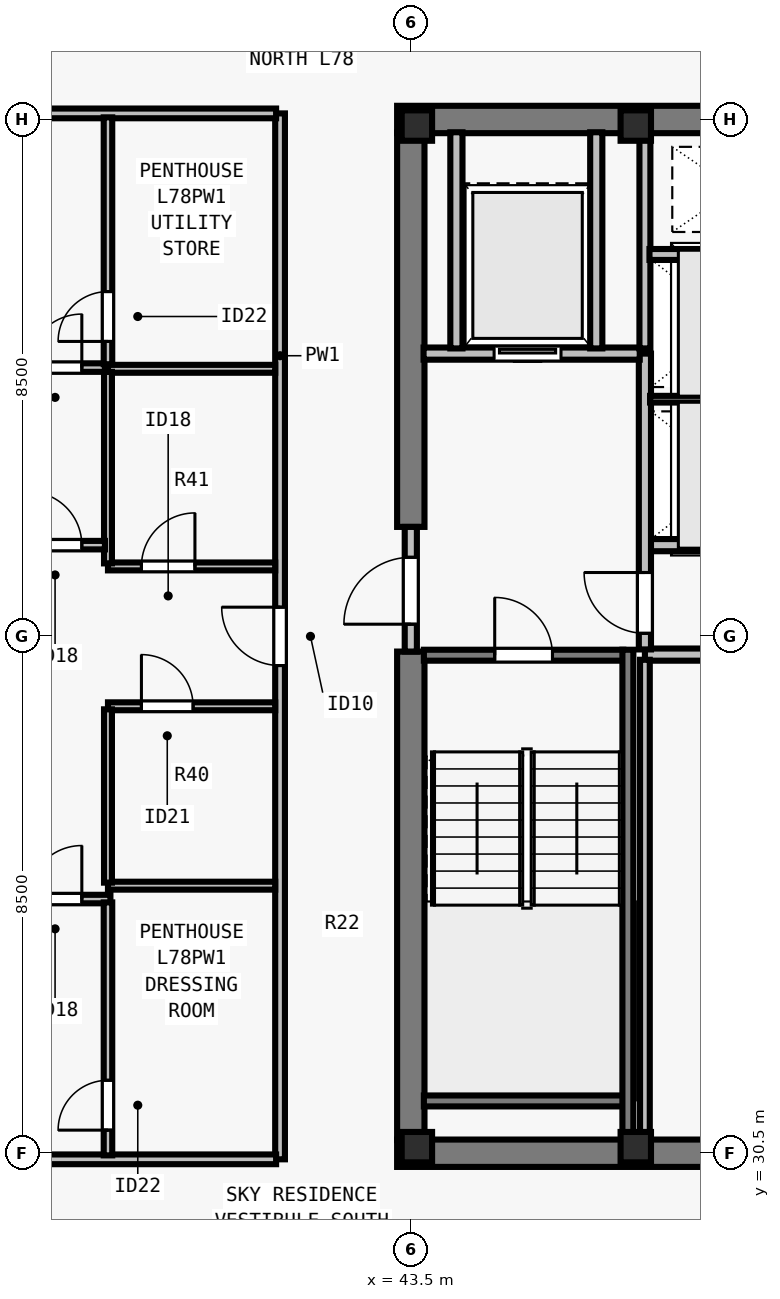
"""IFC4 building model, lengths in metres.
Left out: names, types, materials, properties, quantities, classifications, styles, units other than length and angle.
Written with IfcOpenShell. Run it as: python <this file> out.ifc"""

import sys

from ifc_helpers import new_model, si_unit, direction, frame, frame_2d, origin, origin_2d, place, context, subcontext, project, spatial, rectangle, i_section, extrude, element, fill, save


model = new_model("IFC4")
c1 = context("Model", 3, precision=1e-05, world=origin(), true_north=direction((0.0, 1.0)))
c2 = subcontext(c1, "Body", "Model", "MODEL_VIEW")
j1 = project(units=[si_unit("LENGTHUNIT", "METRE"), si_unit("PLANEANGLEUNIT", "RADIAN")], contexts=[c1])
p1 = place(None, origin())
s1 = spatial("IfcSite", under=j1, at=p1, CompositionType="ELEMENT")
p2 = place(p1, origin())
s2 = spatial("IfcBuilding", under=s1, at=p2, CompositionType="ELEMENT")
p3 = place(p2, frame((0.0, 0.0, 284.0)))
s3 = spatial("IfcBuildingStorey", under=s2, at=p3, CompositionType="ELEMENT", Elevation=284.0)
for number, where, z_axis, x_axis in (
    (1, (43.6, 30.6, 0.0), (0.0, 0.0, 1.0), (1.0, 0.0, 0.0)),
    (2, (47.2, 30.6, 0.0), (0.0, 0.0, 1.0), (1.0, 0.0, 0.0)),
    (3, (43.6, 47.4, 0.0), (0.0, 0.0, 1.0), (1.0, 0.0, 0.0)),
    (4, (47.2, 47.4, 0.0), (0.0, 0.0, 1.0), (1.0, 0.0, 0.0)),
):
    element("IfcColumn", number, at=place(p3, frame(where, z_axis=z_axis, x_axis=x_axis)), inside=s3, PredefinedType="COLUMN", context=c2, shape_type="SweptSolid", body=[
        extrude(i_section(OverallWidth=0.5, OverallDepth=0.5, WebThickness=0.028, FlangeThickness=0.045, at=origin_2d()), origin(), (0.0, 0.0, 1.0), 3.5),
    ])
for number, where, z_axis, x_axis in (
    (5, (43.275, 30.5, 0.0), (0.0, 0.0, 1.0), (1.0, 0.0, 0.0)),
    (6, (43.275, 47.5, 0.0), (0.0, 0.0, 1.0), (1.0, 0.0, 0.0)),
):
    element("IfcWall", number, at=place(p3, frame(where, z_axis=z_axis, x_axis=x_axis)), inside=s3, PredefinedType="SHEAR", context=c2, shape_type="SweptSolid", body=[
        extrude(rectangle(XDim=17.45, YDim=0.45, at=frame_2d((8.725, 0.0))), origin(), (0.0, 0.0, 1.0), 3.29),
    ])
p4 = place(p3, frame((43.5, 30.715, 0.0), z_axis=(0.0, 0.0, 1.0), x_axis=(0.0, 1.0, 0.0)))
e7 = element("IfcWall", 7, at=p4, inside=s3, PredefinedType="SHEAR", context=c2, shape_type="SweptSolid", body=[
    extrude(rectangle(XDim=8.035, YDim=0.45, at=frame_2d((4.018, 0.0))), origin(), (0.0, 0.0, 1.0), 3.29),
])
p5 = place(p3, frame((43.5, 40.8, 0.0), z_axis=(0.0, 0.0, 1.0), x_axis=(0.0, 1.0, 0.0)))
e8 = element("IfcWall", 8, at=p5, inside=s3, PredefinedType="SHEAR", context=c2, shape_type="SweptSolid", body=[
    extrude(rectangle(XDim=6.485, YDim=0.45, at=frame_2d((3.242, 0.0))), origin(), (0.0, 0.0, 1.0), 3.29),
])
for number, where, z_axis, x_axis in (
    (9, (47.35, 38.7, 0.0), (0.0, 0.0, 1.0), (1.0, 0.0, 0.0)),
    (10, (47.35, 40.5, 0.0), (0.0, 0.0, 1.0), (1.0, 0.0, 0.0)),
):
    element("IfcWall", number, at=place(p3, frame(where, z_axis=z_axis, x_axis=x_axis)), inside=s3, PredefinedType="SOLIDWALL", context=c2, shape_type="SweptSolid", body=[
        extrude(rectangle(XDim=2.95, YDim=0.2, at=frame_2d((1.475, 0.0))), origin(), (0.0, 0.0, 1.0), 3.29),
    ])
p6 = place(p3, frame((43.5, 38.75, 0.0), z_axis=(0.0, 0.0, 1.0), x_axis=(0.0, 1.0, 0.0)))
e11 = element("IfcWall", 11, at=p6, inside=s3, PredefinedType="SOLIDWALL", context=c2, shape_type="SweptSolid", body=[
    extrude(rectangle(XDim=2.05, YDim=0.2, at=frame_2d((1.025, 0.0))), origin(), (0.0, 0.0, 1.0), 3.29),
])
p7 = place(p6, frame((0.45, 0.0, 0.0)))
e12 = element("IfcOpeningElement", 12, at=p7, cuts=e11, PredefinedType="OPENING", context=c2, shape_type="SweptSolid", body=[
    extrude(rectangle(XDim=1.1, YDim=2.15, at=frame_2d((0.55, 1.075))), frame((0.0, 0.11, 0.0), z_axis=(0.0, -1.0, 0.0), x_axis=(1.0, 0.0, 0.0)), (0.0, 0.0, 1.0), 0.22),
])
p8 = place(p3, frame((47.35, 38.785, 0.0), z_axis=(0.0, 0.0, 1.0), x_axis=(0.0, 1.0, 0.0)))
e13 = element("IfcWall", 13, at=p8, inside=s3, PredefinedType="SOLIDWALL", context=c2, shape_type="SweptSolid", body=[
    extrude(rectangle(XDim=4.865, YDim=0.2, at=frame_2d((2.433, 0.0))), origin(), (0.0, 0.0, 1.0), 3.29),
])
p9 = place(p8, frame((0.265, 0.0, 0.0)))
e14 = element("IfcOpeningElement", 14, at=p9, cuts=e13, PredefinedType="OPENING", context=c2, shape_type="SweptSolid", body=[
    extrude(rectangle(XDim=1.0, YDim=2.15, at=frame_2d((0.5, 1.075))), frame((0.0, 0.11, 0.0), z_axis=(0.0, -1.0, 0.0), x_axis=(1.0, 0.0, 0.0)), (0.0, 0.0, 1.0), 0.22),
])
p10 = place(p3, frame((43.71, 43.65, 0.0), z_axis=(0.0, 0.0, 1.0), x_axis=(1.0, 0.0, 0.0)))
e15 = element("IfcWall", 15, at=p10, inside=s3, PredefinedType="SOLIDWALL", context=c2, shape_type="SweptSolid", body=[
    extrude(rectangle(XDim=3.555, YDim=0.2, at=frame_2d((1.777, 0.0))), origin(), (0.0, 0.0, 1.0), 3.29),
])
p11 = place(p10, frame((1.16, 0.0, 0.0)))
e16 = element("IfcOpeningElement", 16, at=p11, cuts=e15, PredefinedType="OPENING", context=c2, shape_type="SweptSolid", body=[
    extrude(rectangle(XDim=1.1, YDim=2.2, at=frame_2d((0.55, 1.1))), frame((0.0, 0.11, 0.0), z_axis=(0.0, -1.0, 0.0), x_axis=(1.0, 0.0, 0.0)), (0.0, 0.0, 1.0), 0.22),
])
for number, where, z_axis, x_axis in (
    (17, (46.55, 43.735, 0.0), (0.0, 0.0, 1.0), (0.0, 1.0, 0.0)),
    (18, (44.25, 43.735, 0.0), (0.0, 0.0, 1.0), (0.0, 1.0, 0.0)),
):
    element("IfcWall", number, at=place(p3, frame(where, z_axis=z_axis, x_axis=x_axis)), inside=s3, PredefinedType="SOLIDWALL", context=c2, shape_type="SweptSolid", body=[
        extrude(rectangle(XDim=3.555, YDim=0.2, at=frame_2d((1.777, 0.0))), origin(), (0.0, 0.0, 1.0), 3.29),
    ])
p12 = place(p3, frame((47.35, 30.71, 0.0), z_axis=(0.0, 0.0, 1.0), x_axis=(0.0, 1.0, 0.0)))
e19 = element("IfcWall", 19, at=p12, inside=s3, PredefinedType="PARTITIONING", context=c2, shape_type="SweptSolid", body=[
    extrude(rectangle(XDim=7.905, YDim=0.16, at=frame_2d((3.953, 0.0))), origin(), (0.0, 0.0, 1.0), 3.29),
])
p13 = place(p3, frame((47.35, 43.735, 0.0), z_axis=(0.0, 0.0, 1.0), x_axis=(0.0, 1.0, 0.0)))
e20 = element("IfcWall", 20, at=p13, inside=s3, PredefinedType="SOLIDWALL", context=c2, shape_type="SweptSolid", body=[
    extrude(rectangle(XDim=3.555, YDim=0.18, at=frame_2d((1.777, 0.0))), origin(), (0.0, 0.0, 1.0), 3.29),
])
p14 = place(p3, frame((47.435, 42.9, 0.0), z_axis=(0.0, 0.0, 1.0), x_axis=(1.0, 0.0, 0.0)))
e21 = element("IfcWall", 21, at=p14, inside=s3, PredefinedType="PARTITIONING", context=c2, shape_type="SweptSolid", body=[
    extrude(rectangle(XDim=2.78, YDim=0.11, at=frame_2d((1.39, 0.0))), origin(), (0.0, 0.0, 1.0), 3.29),
])
p15 = place(p3, frame((47.425, 45.28, 0.0), z_axis=(0.0, 0.0, 1.0), x_axis=(1.0, 0.0, 0.0)))
e22 = element("IfcWall", 22, at=p15, inside=s3, PredefinedType="SOLIDWALL", context=c2, shape_type="SweptSolid", body=[
    extrude(rectangle(XDim=2.79, YDim=0.18, at=frame_2d((1.395, 0.0))), origin(), (0.0, 0.0, 1.0), 3.29),
])
p16 = place(p3, frame((41.35, 30.4, 0.0), z_axis=(0.0, 0.0, 1.0), x_axis=(0.0, 1.0, 0.0)))
e23 = element("IfcWall", 23, at=p16, inside=s3, PredefinedType="PARTITIONING", context=c2, shape_type="SweptSolid", body=[
    extrude(rectangle(XDim=17.2, YDim=0.16, at=frame_2d((8.6, 0.0))), origin(), (0.0, 0.0, 1.0), 3.009),
])
p17 = place(p16, frame((8.12, 0.0, 0.0)))
e24 = element("IfcOpeningElement", 24, at=p17, cuts=e23, PredefinedType="OPENING", context=c2, shape_type="SweptSolid", body=[
    extrude(rectangle(XDim=0.96, YDim=2.18, at=frame_2d((0.48, 1.09))), frame((0.0, 0.09, 0.0), z_axis=(0.0, -1.0, 0.0), x_axis=(1.0, 0.0, 0.0)), (0.0, 0.0, 1.0), 0.18),
])
for number, where, z_axis, x_axis in (
    (25, (31.285, 30.4, 0.0), (0.0, 0.0, 1.0), (1.0, 0.0, 0.0)),
    (26, (31.285, 47.6, 0.0), (0.0, 0.0, 1.0), (1.0, 0.0, 0.0)),
):
    element("IfcWall", number, at=place(p3, frame(where, z_axis=z_axis, x_axis=x_axis)), inside=s3, PredefinedType="PARTITIONING", context=c2, shape_type="SweptSolid", body=[
        extrude(rectangle(XDim=10.0, YDim=0.16, at=frame_2d((5.0, 0.0))), origin(), (0.0, 0.0, 1.0), 3.29),
    ])
p18 = place(p3, frame((38.52, 34.9, 0.0), z_axis=(0.0, 0.0, 1.0), x_axis=(1.0, 0.0, 0.0)))
e27 = element("IfcWall", 27, at=p18, inside=s3, PredefinedType="PLUMBINGWALL", context=c2, shape_type="SweptSolid", body=[
    extrude(rectangle(XDim=2.75, YDim=0.13, at=frame_2d((1.375, 0.0))), origin(), (0.0, 0.0, 1.0), 3.29),
])
p19 = place(p3, frame((38.52, 37.85, 0.0), z_axis=(0.0, 0.0, 1.0), x_axis=(1.0, 0.0, 0.0)))
e28 = element("IfcWall", 28, at=p19, inside=s3, PredefinedType="PLUMBINGWALL", context=c2, shape_type="SweptSolid", body=[
    extrude(rectangle(XDim=2.75, YDim=0.13, at=frame_2d((1.375, 0.0))), origin(), (0.0, 0.0, 1.0), 3.29),
])
p20 = place(p19, frame((0.55, 0.0, 0.0)))
e29 = element("IfcOpeningElement", 29, at=p20, cuts=e28, PredefinedType="OPENING", context=c2, shape_type="SweptSolid", body=[
    extrude(rectangle(XDim=0.85, YDim=2.08, at=frame_2d((0.425, 1.04))), frame((0.0, 0.075, 0.0), z_axis=(0.0, -1.0, 0.0), x_axis=(1.0, 0.0, 0.0)), (0.0, 0.0, 1.0), 0.15),
])
p21 = place(p3, frame((38.52, 34.95, 0.0), z_axis=(0.0, 0.0, 1.0), x_axis=(0.0, 1.0, 0.0)))
e30 = element("IfcWall", 30, at=p21, inside=s3, PredefinedType="PLUMBINGWALL", context=c2, shape_type="SweptSolid", body=[
    extrude(rectangle(XDim=2.85, YDim=0.13, at=frame_2d((1.425, 0.0))), origin(), (0.0, 0.0, 1.0), 3.29),
])
p22 = place(p3, frame((38.52, 43.4, 0.0), z_axis=(0.0, 0.0, 1.0), x_axis=(1.0, 0.0, 0.0)))
e31 = element("IfcWall", 31, at=p22, inside=s3, PredefinedType="PLUMBINGWALL", context=c2, shape_type="SweptSolid", body=[
    extrude(rectangle(XDim=2.75, YDim=0.13, at=frame_2d((1.375, 0.0))), origin(), (0.0, 0.0, 1.0), 3.29),
])
p23 = place(p3, frame((38.52, 40.15, 0.0), z_axis=(0.0, 0.0, 1.0), x_axis=(1.0, 0.0, 0.0)))
e32 = element("IfcWall", 32, at=p23, inside=s3, PredefinedType="PLUMBINGWALL", context=c2, shape_type="SweptSolid", body=[
    extrude(rectangle(XDim=2.75, YDim=0.13, at=frame_2d((1.375, 0.0))), origin(), (0.0, 0.0, 1.0), 3.29),
])
p24 = place(p23, frame((0.55, 0.0, 0.0)))
e33 = element("IfcOpeningElement", 33, at=p24, cuts=e32, PredefinedType="OPENING", context=c2, shape_type="SweptSolid", body=[
    extrude(rectangle(XDim=0.88, YDim=2.1, at=frame_2d((0.44, 1.05))), frame((0.0, 0.075, 0.0), z_axis=(0.0, -1.0, 0.0), x_axis=(1.0, 0.0, 0.0)), (0.0, 0.0, 1.0), 0.15),
])
p25 = place(p3, frame((38.52, 40.2, 0.0), z_axis=(0.0, 0.0, 1.0), x_axis=(0.0, 1.0, 0.0)))
e34 = element("IfcWall", 34, at=p25, inside=s3, PredefinedType="PLUMBINGWALL", context=c2, shape_type="SweptSolid", body=[
    extrude(rectangle(XDim=3.15, YDim=0.13, at=frame_2d((1.575, 0.0))), origin(), (0.0, 0.0, 1.0), 3.009),
])
p26 = place(p3, frame((31.38, 34.68, 0.0), z_axis=(0.0, 0.0, 1.0), x_axis=(1.0, 0.0, 0.0)))
e35 = element("IfcWall", 35, at=p26, inside=s3, PredefinedType="PARTITIONING", context=c2, shape_type="SweptSolid", body=[
    extrude(rectangle(XDim=7.18, YDim=0.14, at=frame_2d((3.59, 0.0))), origin(), (0.0, 0.0, 1.0), 3.29),
])
p27 = place(p26, frame((5.83, 0.0, 0.0)))
e36 = element("IfcOpeningElement", 36, at=p27, cuts=e35, PredefinedType="OPENING", context=c2, shape_type="SweptSolid", body=[
    extrude(rectangle(XDim=0.88, YDim=2.1, at=frame_2d((0.44, 1.05))), frame((0.0, 0.08, 0.0), z_axis=(0.0, -1.0, 0.0), x_axis=(1.0, 0.0, 0.0)), (0.0, 0.0, 1.0), 0.16),
])
p28 = place(p3, frame((38.52, 30.465, 0.0), z_axis=(0.0, 0.0, 1.0), x_axis=(0.0, 1.0, 0.0)))
e37 = element("IfcWall", 37, at=p28, inside=s3, PredefinedType="PARTITIONING", context=c2, shape_type="SweptSolid", body=[
    extrude(rectangle(XDim=4.16, YDim=0.14, at=frame_2d((2.08, 0.0))), origin(), (0.0, 0.0, 1.0), 3.29),
])
p29 = place(p28, frame((0.415, 0.0, 0.0)))
e38 = element("IfcOpeningElement", 38, at=p29, cuts=e37, PredefinedType="OPENING", context=c2, shape_type="SweptSolid", body=[
    extrude(rectangle(XDim=0.82, YDim=2.1, at=frame_2d((0.41, 1.05))), frame((0.0, 0.08, 0.0), z_axis=(0.0, -1.0, 0.0), x_axis=(1.0, 0.0, 0.0)), (0.0, 0.0, 1.0), 0.16),
])
p30 = place(p3, frame((31.38, 43.42, 0.0), z_axis=(0.0, 0.0, 1.0), x_axis=(1.0, 0.0, 0.0)))
e39 = element("IfcWall", 39, at=p30, inside=s3, PredefinedType="PARTITIONING", context=c2, shape_type="SweptSolid", body=[
    extrude(rectangle(XDim=7.09, YDim=0.14, at=frame_2d((3.545, 0.0))), origin(), (0.0, 0.0, 1.0), 3.29),
])
p31 = place(p30, frame((5.83, 0.0, 0.0)))
e40 = element("IfcOpeningElement", 40, at=p31, cuts=e39, PredefinedType="OPENING", context=c2, shape_type="SweptSolid", body=[
    extrude(rectangle(XDim=0.88, YDim=2.1, at=frame_2d((0.44, 1.05))), frame((0.0, 0.08, 0.0), z_axis=(0.0, -1.0, 0.0), x_axis=(1.0, 0.0, 0.0)), (0.0, 0.0, 1.0), 0.16),
])
p32 = place(p3, frame((38.52, 43.475, 0.0), z_axis=(0.0, 0.0, 1.0), x_axis=(0.0, 1.0, 0.0)))
e41 = element("IfcWall", 41, at=p32, inside=s3, PredefinedType="PARTITIONING", context=c2, shape_type="SweptSolid", body=[
    extrude(rectangle(XDim=4.06, YDim=0.14, at=frame_2d((2.03, 0.0))), origin(), (0.0, 0.0, 1.0), 3.29),
])
p33 = place(p32, frame((0.375, 0.0, 0.0)))
e42 = element("IfcOpeningElement", 42, at=p33, cuts=e41, PredefinedType="OPENING", context=c2, shape_type="SweptSolid", body=[
    extrude(rectangle(XDim=0.82, YDim=2.1, at=frame_2d((0.41, 1.05))), frame((0.0, 0.08, 0.0), z_axis=(0.0, -1.0, 0.0), x_axis=(1.0, 0.0, 0.0)), (0.0, 0.0, 1.0), 0.16),
])
p34 = place(p3, frame((31.38, 40.5, 0.0), z_axis=(0.0, 0.0, 1.0), x_axis=(1.0, 0.0, 0.0)))
e43 = element("IfcWall", 43, at=p34, inside=s3, PredefinedType="PARTITIONING", context=c2, shape_type="SweptSolid", body=[
    extrude(rectangle(XDim=7.09, YDim=0.14, at=frame_2d((3.545, 0.0))), origin(), (0.0, 0.0, 1.0), 3.29),
])
p35 = place(p34, frame((5.83, 0.0, 0.0)))
e44 = element("IfcOpeningElement", 44, at=p35, cuts=e43, PredefinedType="OPENING", context=c2, shape_type="SweptSolid", body=[
    extrude(rectangle(XDim=0.88, YDim=2.1, at=frame_2d((0.44, 1.05))), frame((0.0, 0.08, 0.0), z_axis=(0.0, -1.0, 0.0), x_axis=(1.0, 0.0, 0.0)), (0.0, 0.0, 1.0), 0.16),
])
p36 = place(p3, frame((43.715, 38.69, 0.0), z_axis=(0.0, 0.0, 1.0), x_axis=(1.0, 0.0, 0.0)))
e45 = element("IfcWall", 45, at=p36, inside=s3, PredefinedType="SOLIDWALL", context=c2, shape_type="SweptSolid", body=[
    extrude(rectangle(XDim=3.28, YDim=0.18, at=frame_2d((1.64, 0.0))), origin(), (0.0, 0.0, 1.0), 3.29),
])
p37 = place(p36, frame((1.165, 0.0, 0.0)))
e46 = element("IfcOpeningElement", 46, at=p37, cuts=e45, PredefinedType="OPENING", context=c2, shape_type="SweptSolid", body=[
    extrude(rectangle(XDim=0.95, YDim=2.15, at=frame_2d((0.475, 1.075))), frame((0.0, 0.1, 0.0), z_axis=(0.0, -1.0, 0.0), x_axis=(1.0, 0.0, 0.0)), (0.0, 0.0, 1.0), 0.2),
])
p38 = place(p3, frame((43.715, 31.36, 0.0), z_axis=(0.0, 0.0, 1.0), x_axis=(1.0, 0.0, 0.0)))
e47 = element("IfcWall", 47, at=p38, inside=s3, PredefinedType="SOLIDWALL", context=c2, shape_type="SweptSolid", body=[
    extrude(rectangle(XDim=3.28, YDim=0.18, at=frame_2d((1.64, 0.0))), origin(), (0.0, 0.0, 1.0), 3.29),
])
p39 = place(p3, frame((47.07, 38.78, 0.0), z_axis=(0.0, 0.0, 1.0), x_axis=(0.0, -1.0, 0.0)))
e48 = element("IfcWall", 48, at=p39, inside=s3, PredefinedType="SOLIDWALL", context=c2, shape_type="SweptSolid", body=[
    extrude(rectangle(XDim=8.067, YDim=0.18, at=frame_2d((4.034, 0.0))), origin(), (0.0, 0.0, 1.0), 3.29),
])
p40 = place(p7, origin())
e49 = element("IfcDoor", 49, at=p40, inside=s3, OperationType="SINGLE_SWING_LEFT", PredefinedType="DOOR", context=c2, shape_type="SweptSolid", body=[
    extrude(rectangle(XDim=1.1, YDim=2.15, at=frame_2d((0.55, 1.075))), frame((0.0, 0.025, 0.0), z_axis=(0.0, -1.0, 0.0), x_axis=(1.0, 0.0, 0.0)), (0.0, 0.0, 1.0), 0.05),
])
fill(e12, e49)
p41 = place(p9, origin())
e50 = element("IfcDoor", 50, at=p41, inside=s3, OperationType="SINGLE_SWING_RIGHT", PredefinedType="DOOR", context=c2, shape_type="SweptSolid", body=[
    extrude(rectangle(XDim=1.0, YDim=2.15, at=frame_2d((0.5, 1.075))), frame((0.0, 0.025, 0.0), z_axis=(0.0, -1.0, 0.0), x_axis=(1.0, 0.0, 0.0)), (0.0, 0.0, 1.0), 0.05),
])
fill(e14, e50)
p42 = place(p11, origin())
e51 = element("IfcDoor", 51, at=p42, inside=s3, OperationType="SLIDING_TO_LEFT", PredefinedType="DOOR", context=c2, shape_type="SweptSolid", body=[
    extrude(rectangle(XDim=1.1, YDim=2.2, at=frame_2d((0.55, 1.1))), frame((0.0, 0.025, 0.0), z_axis=(0.0, -1.0, 0.0), x_axis=(1.0, 0.0, 0.0)), (0.0, 0.0, 1.0), 0.05),
])
fill(e16, e51)
p43 = place(p20, origin())
e52 = element("IfcDoor", 52, at=p43, inside=s3, OperationType="SINGLE_SWING_LEFT", PredefinedType="DOOR", context=c2, shape_type="SweptSolid", body=[
    extrude(rectangle(XDim=0.85, YDim=2.08, at=frame_2d((0.425, 1.04))), frame((0.0, 0.025, 0.0), z_axis=(0.0, -1.0, 0.0), x_axis=(1.0, 0.0, 0.0)), (0.0, 0.0, 1.0), 0.05),
])
fill(e29, e52)
p44 = place(p24, origin())
e53 = element("IfcDoor", 53, at=p44, inside=s3, OperationType="SINGLE_SWING_RIGHT", PredefinedType="DOOR", context=c2, shape_type="SweptSolid", body=[
    extrude(rectangle(XDim=0.88, YDim=2.1, at=frame_2d((0.44, 1.05))), frame((0.0, 0.025, 0.0), z_axis=(0.0, -1.0, 0.0), x_axis=(1.0, 0.0, 0.0)), (0.0, 0.0, 1.0), 0.05),
])
fill(e33, e53)
p45 = place(p29, origin())
e54 = element("IfcDoor", 54, at=p45, inside=s3, OperationType="SINGLE_SWING_LEFT", PredefinedType="DOOR", context=c2, shape_type="SweptSolid", body=[
    extrude(rectangle(XDim=0.82, YDim=2.1, at=frame_2d((0.41, 1.05))), frame((0.0, 0.025, 0.0), z_axis=(0.0, -1.0, 0.0), x_axis=(1.0, 0.0, 0.0)), (0.0, 0.0, 1.0), 0.05),
])
fill(e38, e54)
p46 = place(p27, origin())
e55 = element("IfcDoor", 55, at=p46, inside=s3, OperationType="SINGLE_SWING_RIGHT", PredefinedType="DOOR", context=c2, shape_type="SweptSolid", body=[
    extrude(rectangle(XDim=0.88, YDim=2.1, at=frame_2d((0.44, 1.05))), frame((0.0, 0.025, 0.0), z_axis=(0.0, -1.0, 0.0), x_axis=(1.0, 0.0, 0.0)), (0.0, 0.0, 1.0), 0.05),
])
fill(e36, e55)
p47 = place(p33, origin())
e56 = element("IfcDoor", 56, at=p47, inside=s3, OperationType="SINGLE_SWING_LEFT", PredefinedType="DOOR", context=c2, shape_type="SweptSolid", body=[
    extrude(rectangle(XDim=0.82, YDim=2.1, at=frame_2d((0.41, 1.05))), frame((0.0, 0.025, 0.0), z_axis=(0.0, -1.0, 0.0), x_axis=(1.0, 0.0, 0.0)), (0.0, 0.0, 1.0), 0.05),
])
fill(e42, e56)
p48 = place(p31, origin())
e57 = element("IfcDoor", 57, at=p48, inside=s3, OperationType="SINGLE_SWING_RIGHT", PredefinedType="DOOR", context=c2, shape_type="SweptSolid", body=[
    extrude(rectangle(XDim=0.88, YDim=2.1, at=frame_2d((0.44, 1.05))), frame((0.0, 0.025, 0.0), z_axis=(0.0, -1.0, 0.0), x_axis=(1.0, 0.0, 0.0)), (0.0, 0.0, 1.0), 0.05),
])
fill(e40, e57)
p49 = place(p35, origin())
e58 = element("IfcDoor", 58, at=p49, inside=s3, OperationType="SINGLE_SWING_LEFT", PredefinedType="DOOR", context=c2, shape_type="SweptSolid", body=[
    extrude(rectangle(XDim=0.88, YDim=2.1, at=frame_2d((0.44, 1.05))), frame((0.0, 0.025, 0.0), z_axis=(0.0, -1.0, 0.0), x_axis=(1.0, 0.0, 0.0)), (0.0, 0.0, 1.0), 0.05),
])
fill(e44, e58)
p50 = place(p17, origin())
e59 = element("IfcDoor", 59, at=p50, inside=s3, OperationType="SINGLE_SWING_RIGHT", PredefinedType="DOOR", context=c2, shape_type="SweptSolid", body=[
    extrude(rectangle(XDim=0.96, YDim=2.18, at=frame_2d((0.48, 1.09))), frame((0.0, 0.025, 0.0), z_axis=(0.0, -1.0, 0.0), x_axis=(1.0, 0.0, 0.0)), (0.0, 0.0, 1.0), 0.05),
])
fill(e24, e59)
p51 = place(p37, origin())
e60 = element("IfcDoor", 60, at=p51, inside=s3, OperationType="SINGLE_SWING_LEFT", PredefinedType="DOOR", context=c2, shape_type="SweptSolid", body=[
    extrude(rectangle(XDim=0.95, YDim=2.15, at=frame_2d((0.475, 1.075))), frame((0.0, 0.025, 0.0), z_axis=(0.0, -1.0, 0.0), x_axis=(1.0, 0.0, 0.0)), (0.0, 0.0, 1.0), 0.05),
])
fill(e46, e60)
save(model, sys.argv[1])
